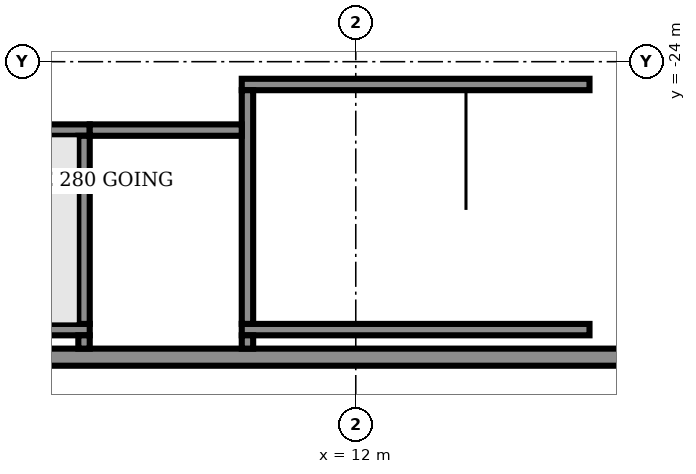
"""IFC4 building model, lengths in metres.
Left out: names, types, materials, properties, quantities, classifications, styles, units other than length and angle.
Written with IfcOpenShell. Run it as: python <this file> out.ifc"""

import sys

from ifc_helpers import new_model, si_unit, direction, frame, frame_2d, origin, origin_2d, place, context, subcontext, project, spatial, rectangle, extrude, element, fill, save


model = new_model("IFC4")
c1 = context("Model", 3, precision=1e-05, world=origin(), true_north=direction((0.0, 1.0)))
c2 = subcontext(c1, "Body", "Model", "MODEL_VIEW")
j1 = project(units=[si_unit("LENGTHUNIT", "METRE"), si_unit("PLANEANGLEUNIT", "RADIAN")], contexts=[c1])
p1 = place(None, origin())
s1 = spatial("IfcSite", under=j1, at=p1, CompositionType="ELEMENT")
p2 = place(p1, origin())
s2 = spatial("IfcBuilding", under=s1, at=p2, CompositionType="ELEMENT")
p3 = place(p2, origin())
s3 = spatial("IfcBuildingStorey", under=s2, at=p3, CompositionType="ELEMENT", Elevation=0.0)
for number, where, z_axis, x_axis in (
    (1, (19.0, -29.0, 0.0), (0.0, 0.0, 1.0), (1.0, 0.0, 0.0)),
    (2, (8.0, -29.0, 0.0), (0.0, 0.0, 1.0), (1.0, 0.0, 0.0)),
):
    element("IfcColumn", number, at=place(p3, frame(where, z_axis=z_axis, x_axis=x_axis)), inside=s3, PredefinedType="COLUMN", context=c2, shape_type="SweptSolid", body=[
        extrude(rectangle(XDim=1.0, YDim=1.0, at=origin_2d()), origin(), (0.0, 0.0, 1.0), 8.0),
    ])
p4 = place(p3, frame((3.5, -31.775, 0.0), z_axis=(0.0, 0.0, 1.0), x_axis=(1.0, 0.0, 0.0)))
e3 = element("IfcWall", 3, at=p4, inside=s3, PredefinedType="SOLIDWALL", context=c2, shape_type="SweptSolid", body=[
    extrude(rectangle(XDim=26.5, YDim=0.45, at=frame_2d((13.25, 0.0))), origin(), (0.0, 0.0, 1.0), 7.7),
])
p5 = place(p4, frame((3.6, 0.0, 0.0)))
e4 = element("IfcOpeningElement", 4, at=p5, cuts=e3, PredefinedType="OPENING", context=c2, shape_type="SweptSolid", body=[
    extrude(rectangle(XDim=1.8, YDim=2.4, at=frame_2d((0.9, 1.2))), frame((0.0, 0.235, 0.0), z_axis=(0.0, -1.0, 0.0), x_axis=(1.0, 0.0, 0.0)), (0.0, 0.0, 1.0), 0.47),
])
p6 = place(p4, frame((13.6, 0.0, 0.0)))
e5 = element("IfcOpeningElement", 5, at=p6, cuts=e3, PredefinedType="OPENING", context=c2, shape_type="SweptSolid", body=[
    extrude(rectangle(XDim=1.8, YDim=2.4, at=frame_2d((0.9, 1.2))), frame((0.0, 0.235, 0.0), z_axis=(0.0, -1.0, 0.0), x_axis=(1.0, 0.0, 0.0)), (0.0, 0.0, 1.0), 0.47),
])
p7 = place(p3, frame((-4.5, -31.05, 0.0), z_axis=(0.0, 0.0, 1.0), x_axis=(1.0, 0.0, 0.0)))
e6 = element("IfcWall", 6, at=p7, inside=s3, PredefinedType="SHEAR", context=c2, shape_type="SweptSolid", body=[
    extrude(rectangle(XDim=9.5, YDim=0.3, at=frame_2d((4.75, 0.0))), origin(), (0.0, 0.0, 1.0), 7.7),
])
p8 = place(p3, frame((-4.0, -25.8, 0.0), z_axis=(0.0, 0.0, 1.0), x_axis=(1.0, 0.0, 0.0)))
e7 = element("IfcWall", 7, at=p8, inside=s3, PredefinedType="SHEAR", context=c2, shape_type="SweptSolid", body=[
    extrude(rectangle(XDim=9.0, YDim=0.3, at=frame_2d((4.5, 0.0))), origin(), (0.0, 0.0, 1.0), 7.7),
])
p9 = place(p3, frame((4.85, -30.9, 0.0), z_axis=(0.0, 0.0, 1.0), x_axis=(0.0, 1.0, 0.0)))
e8 = element("IfcWall", 8, at=p9, inside=s3, PredefinedType="SHEAR", context=c2, shape_type="SweptSolid", body=[
    extrude(rectangle(XDim=4.95, YDim=0.3, at=frame_2d((2.475, 0.0))), origin(), (0.0, 0.0, 1.0), 7.7),
])
p10 = place(p9, frame((1.275, 0.0, 0.0)))
e9 = element("IfcOpeningElement", 9, at=p10, cuts=e8, PredefinedType="OPENING", context=c2, shape_type="SweptSolid", body=[
    extrude(rectangle(XDim=2.4, YDim=2.1, at=frame_2d((1.2, 1.05))), frame((0.0, 0.16, 0.0), z_axis=(0.0, -1.0, 0.0), x_axis=(1.0, 0.0, 0.0)), (0.0, 0.0, 1.0), 0.32),
])
for number, where, z_axis, x_axis in (
    (10, (9.0, -31.05, 0.0), (0.0, 0.0, 1.0), (1.0, 0.0, 0.0)),
    (11, (9.0, -24.6, 0.0), (0.0, 0.0, 1.0), (1.0, 0.0, 0.0)),
):
    element("IfcWall", number, at=place(p3, frame(where, z_axis=z_axis, x_axis=x_axis)), inside=s3, PredefinedType="SHEAR", context=c2, shape_type="SweptSolid", body=[
        extrude(rectangle(XDim=9.15, YDim=0.3, at=frame_2d((4.575, 0.0))), origin(), (0.0, 0.0, 1.0), 7.7),
    ])
p11 = place(p3, frame((9.15, -30.9, 0.0), z_axis=(0.0, 0.0, 1.0), x_axis=(0.0, 1.0, 0.0)))
e12 = element("IfcWall", 12, at=p11, inside=s3, PredefinedType="SHEAR", context=c2, shape_type="SweptSolid", body=[
    extrude(rectangle(XDim=6.15, YDim=0.3, at=frame_2d((3.075, 0.0))), origin(), (0.0, 0.0, 1.0), 7.7),
])
p12 = place(p3, frame((18.0, -30.9, 0.0), z_axis=(0.0, 0.0, 1.0), x_axis=(0.0, 1.0, 0.0)))
e13 = element("IfcWall", 13, at=p12, inside=s3, PredefinedType="SHEAR", context=c2, shape_type="SweptSolid", body=[
    extrude(rectangle(XDim=6.15, YDim=0.3, at=frame_2d((3.075, 0.0))), origin(), (0.0, 0.0, 1.0), 7.7),
])
p13 = place(p12, frame((2.4, 0.0, 0.0)))
e14 = element("IfcOpeningElement", 14, at=p13, cuts=e13, PredefinedType="OPENING", context=c2, shape_type="SweptSolid", body=[
    extrude(rectangle(XDim=2.4, YDim=2.1, at=frame_2d((1.2, 1.05))), frame((0.0, 0.16, 0.0), z_axis=(0.0, -1.0, 0.0), x_axis=(1.0, 0.0, 0.0)), (0.0, 0.0, 1.0), 0.32),
])
p14 = place(p3, frame((5.0, -25.8, 0.0), z_axis=(0.0, 0.0, 1.0), x_axis=(1.0, 0.0, 0.0)))
e15 = element("IfcWall", 15, at=p14, inside=s3, PredefinedType="PARTITIONING", context=c2, shape_type="SweptSolid", body=[
    extrude(rectangle(XDim=4.0, YDim=0.3, at=frame_2d((2.0, 0.0))), origin(), (0.0, 0.0, 1.0), 7.7),
])
for number, where, z_axis, x_axis in (
    (16, (4.85, -31.55, 0.0), (0.0, 0.0, 1.0), (0.0, 1.0, 0.0)),
    (17, (9.15, -31.55, 0.0), (0.0, 0.0, 1.0), (0.0, 1.0, 0.0)),
):
    element("IfcWall", number, at=place(p3, frame(where, z_axis=z_axis, x_axis=x_axis)), inside=s3, PredefinedType="PARTITIONING", context=c2, shape_type="SweptSolid", body=[
        extrude(rectangle(XDim=0.35, YDim=0.3, at=frame_2d((0.175, 0.0))), origin(), (0.0, 0.0, 1.0), 7.7),
    ])
p15 = place(p5, origin())
e18 = element("IfcDoor", 18, at=p15, inside=s3, OperationType="DOUBLE_DOOR_DOUBLE_SWING", PredefinedType="DOOR", context=c2, shape_type="SweptSolid", body=[
    extrude(rectangle(XDim=1.8, YDim=2.4, at=frame_2d((0.9, 1.2))), frame((0.0, 0.025, 0.0), z_axis=(0.0, -1.0, 0.0), x_axis=(1.0, 0.0, 0.0)), (0.0, 0.0, 1.0), 0.05),
])
fill(e4, e18)
p16 = place(p6, origin())
e19 = element("IfcDoor", 19, at=p16, inside=s3, OperationType="DOUBLE_DOOR_DOUBLE_SWING", PredefinedType="DOOR", context=c2, shape_type="SweptSolid", body=[
    extrude(rectangle(XDim=1.8, YDim=2.4, at=frame_2d((0.9, 1.2))), frame((0.0, 0.025, 0.0), z_axis=(0.0, -1.0, 0.0), x_axis=(1.0, 0.0, 0.0)), (0.0, 0.0, 1.0), 0.05),
])
fill(e5, e19)
p17 = place(p10, origin())
e20 = element("IfcDoor", 20, at=p17, inside=s3, OperationType="DOUBLE_DOOR_SINGLE_SWING", PredefinedType="DOOR", context=c2, shape_type="SweptSolid", body=[
    extrude(rectangle(XDim=2.4, YDim=2.1, at=frame_2d((1.2, 1.05))), frame((0.0, 0.025, 0.0), z_axis=(0.0, -1.0, 0.0), x_axis=(1.0, 0.0, 0.0)), (0.0, 0.0, 1.0), 0.05),
])
fill(e9, e20)
p18 = place(p13, origin())
e21 = element("IfcDoor", 21, at=p18, inside=s3, OperationType="DOUBLE_DOOR_SINGLE_SWING", PredefinedType="DOOR", context=c2, shape_type="SweptSolid", body=[
    extrude(rectangle(XDim=2.4, YDim=2.1, at=frame_2d((1.2, 1.05))), frame((0.0, 0.025, 0.0), z_axis=(0.0, -1.0, 0.0), x_axis=(1.0, 0.0, 0.0)), (0.0, 0.0, 1.0), 0.05),
])
fill(e14, e21)
save(model, sys.argv[1])
